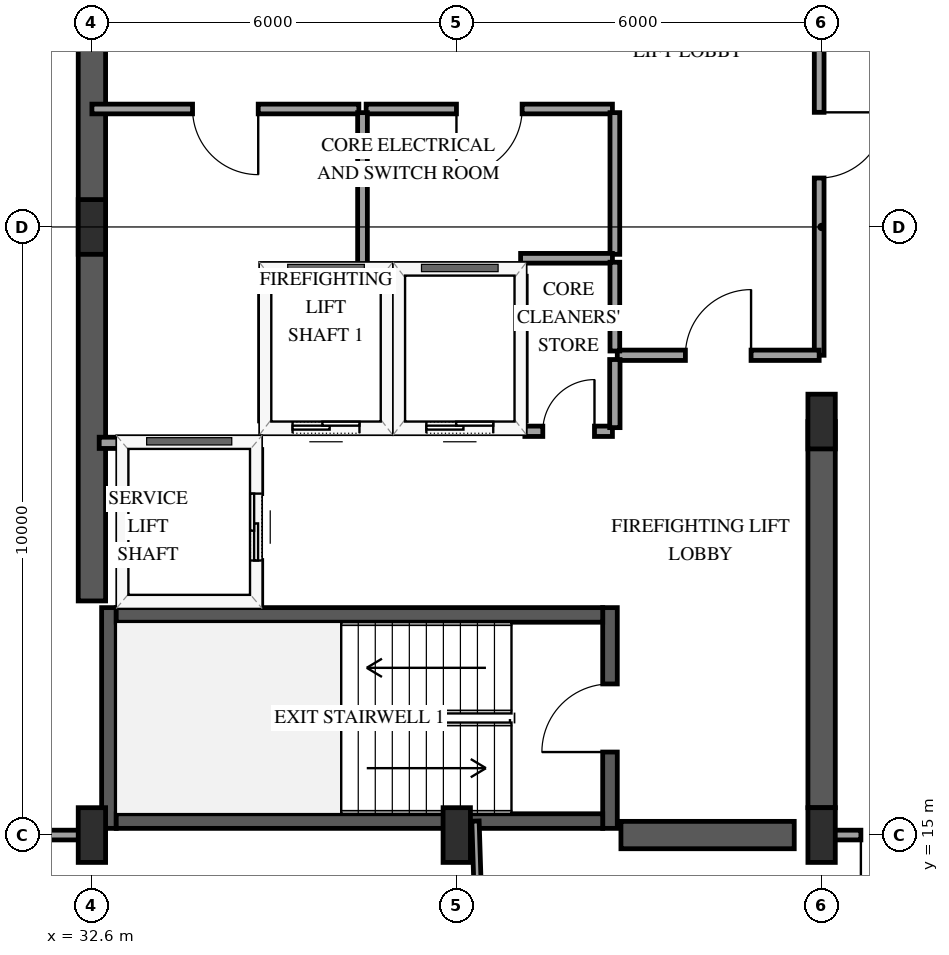
"""IFC4 building model, lengths in metres.
Left out: names, types, materials, properties, quantities, classifications, styles, units other than length and angle.
Written with IfcOpenShell. Run it as: python <this file> out.ifc"""

import sys

from ifc_helpers import new_model, si_unit, direction, frame, frame_2d, origin, origin_2d, place, context, subcontext, project, spatial, rectangle, extrude, element, fill, save


model = new_model("IFC4")
c1 = context("Model", 3, precision=1e-05, world=origin(), true_north=direction((0.0, 1.0)))
c2 = subcontext(c1, "Body", "Model", "MODEL_VIEW")
j1 = project(units=[si_unit("LENGTHUNIT", "METRE"), si_unit("PLANEANGLEUNIT", "RADIAN")], contexts=[c1])
p1 = place(None, origin())
s1 = spatial("IfcSite", under=j1, at=p1, CompositionType="ELEMENT")
p2 = place(p1, origin())
s2 = spatial("IfcBuilding", under=s1, at=p2, CompositionType="ELEMENT")
p3 = place(p2, frame((0.0, 0.0, 261.25)))
s3 = spatial("IfcBuildingStorey", under=s2, at=p3, CompositionType="ELEMENT", Elevation=261.25)
p4 = place(p3, frame((32.88, 15.11, 0.0), z_axis=(0.0, 0.0, 1.0), x_axis=(0.0, 1.0, 0.0)))
e1 = element("IfcWall", 1, at=p4, inside=s3, PredefinedType="SHEAR", context=c2, shape_type="SweptSolid", body=[
    extrude(rectangle(XDim=3.63, YDim=0.24, at=frame_2d((1.815, 0.0))), origin(), (0.0, 0.0, 1.0), 3.75),
])
p5 = place(p3, frame((41.12, 15.11, 0.0), z_axis=(0.0, 0.0, 1.0), x_axis=(0.0, 1.0, 0.0)))
e2 = element("IfcWall", 2, at=p5, inside=s3, PredefinedType="SHEAR", context=c2, shape_type="SweptSolid", body=[
    extrude(rectangle(XDim=3.63, YDim=0.24, at=frame_2d((1.815, 0.0))), origin(), (0.0, 0.0, 1.0), 3.75),
])
p6 = place(p5, frame((1.255, 0.0, 0.0)))
e3 = element("IfcOpeningElement", 3, at=p6, cuts=e2, PredefinedType="OPENING", context=c2, shape_type="SweptSolid", body=[
    extrude(rectangle(XDim=1.12, YDim=2.15, at=frame_2d((0.56, 1.075))), frame((0.0, 0.13, 0.0), z_axis=(0.0, -1.0, 0.0), x_axis=(1.0, 0.0, 0.0)), (0.0, 0.0, 1.0), 0.26),
])
for number, where, z_axis, x_axis in (
    (4, (33.0, 15.23, 0.0), (0.0, 0.0, 1.0), (1.0, 0.0, 0.0)),
    (5, (33.0, 18.62, 0.0), (0.0, 0.0, 1.0), (1.0, 0.0, 0.0)),
):
    element("IfcWall", number, at=place(p3, frame(where, z_axis=z_axis, x_axis=x_axis)), inside=s3, PredefinedType="SHEAR", context=c2, shape_type="SweptSolid", body=[
        extrude(rectangle(XDim=8.0, YDim=0.24, at=frame_2d((4.0, 0.0))), origin(), (0.0, 0.0, 1.0), 3.75),
    ])
p7 = place(p3, frame((32.6, 18.85, 0.0), z_axis=(0.0, 0.0, 1.0), x_axis=(0.0, 1.0, 0.0)))
e6 = element("IfcWall", 6, at=p7, inside=s3, PredefinedType="SHEAR", context=c2, shape_type="SweptSolid", body=[
    extrude(rectangle(XDim=12.3, YDim=0.45, at=frame_2d((6.15, 0.0))), origin(), (0.0, 0.0, 1.0), 3.75),
])
p8 = place(p3, frame((41.3, 15.0, 0.0), z_axis=(0.0, 0.0, 1.0), x_axis=(1.0, 0.0, 0.0)))
e7 = element("IfcWall", 7, at=p8, inside=s3, PredefinedType="SHEAR", context=c2, shape_type="SweptSolid", body=[
    extrude(rectangle(XDim=2.85, YDim=0.45, at=frame_2d((1.425, 0.0))), origin(), (0.0, 0.0, 1.0), 3.75),
])
p9 = place(p3, frame((44.6, 15.45, 0.0), z_axis=(0.0, 0.0, 1.0), x_axis=(0.0, 1.0, 0.0)))
e8 = element("IfcWall", 8, at=p9, inside=s3, PredefinedType="SHEAR", context=c2, shape_type="SweptSolid", body=[
    extrude(rectangle(XDim=6.35, YDim=0.45, at=frame_2d((3.175, 0.0))), origin(), (0.0, 0.0, 1.0), 3.75),
])
for number, where, z_axis, x_axis in (
    (9, (32.6, 15.0, 0.0), (0.0, 0.0, 1.0), (1.0, 0.0, 0.0)),
    (10, (32.6, 25.0, 0.0), (0.0, 0.0, 1.0), (1.0, 0.0, 0.0)),
    (11, (38.6, 15.0, 0.0), (0.0, 0.0, 1.0), (1.0, 0.0, 0.0)),
    (12, (44.6, 15.0, 0.0), (0.0, 0.0, 1.0), (1.0, 0.0, 0.0)),
    (13, (44.6, 21.8, 0.0), (0.0, 0.0, 1.0), (1.0, 0.0, 0.0)),
):
    element("IfcColumn", number, at=place(p3, frame(where, z_axis=z_axis, x_axis=x_axis)), inside=s3, PredefinedType="PILASTER", context=c2, shape_type="SweptSolid", body=[
        extrude(rectangle(XDim=0.45, YDim=0.9, at=origin_2d()), origin(), (0.0, 0.0, 1.0), 3.75),
    ])
p10 = place(p3, frame((35.45, 21.7, 0.0), z_axis=(0.0, 0.0, 1.0), x_axis=(1.0, 0.0, 0.0)))
e14 = element("IfcWall", 14, at=p10, inside=s3, PredefinedType="SOLIDWALL", context=c2, shape_type="SweptSolid", body=[
    extrude(rectangle(XDim=2.0, YDim=0.185, at=frame_2d((1.0, 0.0))), origin(), (0.0, 0.0, 1.0), 3.45),
])
p11 = place(p10, frame((0.45, 0.0, 0.0)))
e15 = element("IfcOpeningElement", 15, at=p11, cuts=e14, PredefinedType="OPENING", context=c2, shape_type="SweptSolid", body=[
    extrude(rectangle(XDim=1.1, YDim=2.15, at=frame_2d((0.55, 1.075))), frame((0.0, 0.103, 0.0), z_axis=(0.0, -1.0, 0.0), x_axis=(1.0, 0.0, 0.0)), (0.0, 0.0, 1.0), 0.205),
])
p12 = place(p3, frame((35.45, 24.3, 0.0), z_axis=(0.0, 0.0, 1.0), x_axis=(1.0, 0.0, 0.0)))
e16 = element("IfcWall", 16, at=p12, inside=s3, PredefinedType="SOLIDWALL", context=c2, shape_type="SweptSolid", body=[
    extrude(rectangle(XDim=2.0, YDim=0.185, at=frame_2d((1.0, 0.0))), origin(), (0.0, 0.0, 1.0), 3.45),
])
for number, where, z_axis, x_axis in (
    (17, (35.45, 21.81, 0.0), (0.0, 0.0, 1.0), (0.0, 1.0, 0.0)),
    (18, (37.45, 21.81, 0.0), (0.0, 0.0, 1.0), (0.0, 1.0, 0.0)),
):
    element("IfcWall", number, at=place(p3, frame(where, z_axis=z_axis, x_axis=x_axis)), inside=s3, PredefinedType="SOLIDWALL", context=c2, shape_type="SweptSolid", body=[
        extrude(rectangle(XDim=2.38, YDim=0.185, at=frame_2d((1.19, 0.0))), origin(), (0.0, 0.0, 1.0), 3.45),
    ])
p13 = place(p3, frame((37.65, 21.7, 0.0), z_axis=(0.0, 0.0, 1.0), x_axis=(1.0, 0.0, 0.0)))
e19 = element("IfcWall", 19, at=p13, inside=s3, PredefinedType="SOLIDWALL", context=c2, shape_type="SweptSolid", body=[
    extrude(rectangle(XDim=2.0, YDim=0.185, at=frame_2d((1.0, 0.0))), origin(), (0.0, 0.0, 1.0), 3.45),
])
p14 = place(p13, frame((0.45, 0.0, 0.0)))
e20 = element("IfcOpeningElement", 20, at=p14, cuts=e19, PredefinedType="OPENING", context=c2, shape_type="SweptSolid", body=[
    extrude(rectangle(XDim=1.1, YDim=2.15, at=frame_2d((0.55, 1.075))), frame((0.0, 0.103, 0.0), z_axis=(0.0, -1.0, 0.0), x_axis=(1.0, 0.0, 0.0)), (0.0, 0.0, 1.0), 0.205),
])
p15 = place(p3, frame((37.65, 24.3, 0.0), z_axis=(0.0, 0.0, 1.0), x_axis=(1.0, 0.0, 0.0)))
e21 = element("IfcWall", 21, at=p15, inside=s3, PredefinedType="SOLIDWALL", context=c2, shape_type="SweptSolid", body=[
    extrude(rectangle(XDim=2.0, YDim=0.185, at=frame_2d((1.0, 0.0))), origin(), (0.0, 0.0, 1.0), 3.45),
])
p16 = place(p3, frame((39.65, 21.81, 0.0), z_axis=(0.0, 0.0, 1.0), x_axis=(0.0, 1.0, 0.0)))
e22 = element("IfcWall", 22, at=p16, inside=s3, PredefinedType="SOLIDWALL", context=c2, shape_type="SweptSolid", body=[
    extrude(rectangle(XDim=2.38, YDim=0.185, at=frame_2d((1.19, 0.0))), origin(), (0.0, 0.0, 1.0), 3.45),
])
p17 = place(p3, frame((32.72, 21.45, 0.0), z_axis=(0.0, 0.0, 1.0), x_axis=(1.0, 0.0, 0.0)))
e23 = element("IfcWall", 23, at=p17, inside=s3, PredefinedType="SOLIDWALL", context=c2, shape_type="SweptSolid", body=[
    extrude(rectangle(XDim=2.58, YDim=0.185, at=frame_2d((1.29, 0.0))), origin(), (0.0, 0.0, 1.0), 3.45),
])
p18 = place(p3, frame((35.3, 18.79, 0.0), z_axis=(0.0, 0.0, 1.0), x_axis=(0.0, 1.0, 0.0)))
e24 = element("IfcWall", 24, at=p18, inside=s3, PredefinedType="SOLIDWALL", context=c2, shape_type="SweptSolid", body=[
    extrude(rectangle(XDim=2.55, YDim=0.185, at=frame_2d((1.275, 0.0))), origin(), (0.0, 0.0, 1.0), 3.45),
])
p19 = place(p18, frame((0.725, 0.0, 0.0)))
e25 = element("IfcOpeningElement", 25, at=p19, cuts=e24, PredefinedType="OPENING", context=c2, shape_type="SweptSolid", body=[
    extrude(rectangle(XDim=1.1, YDim=2.15, at=frame_2d((0.55, 1.075))), frame((0.0, 0.103, 0.0), z_axis=(0.0, -1.0, 0.0), x_axis=(1.0, 0.0, 0.0)), (0.0, 0.0, 1.0), 0.205),
])
p20 = place(p3, frame((38.908, 15.23, 0.0), z_axis=(0.0, 0.0, 1.0), x_axis=(0.031687554573, -0.999497823352, 0.0)))
e26 = element("IfcWall", 26, at=p20, inside=s3, PredefinedType="PARTITIONING", context=c2, shape_type="SweptSolid", body=[
    extrude(rectangle(XDim=7.289, YDim=0.12, at=frame_2d((3.644, 0.0))), origin(), (0.0, 0.0, 1.0), 2.828),
])
p21 = place(p3, frame((44.56, 29.8, 0.0), z_axis=(0.0, 0.0, 1.0), x_axis=(0.0, -1.0, 0.0)))
e27 = element("IfcWall", 27, at=p21, inside=s3, PredefinedType="PARTITIONING", context=c2, shape_type="SweptSolid", body=[
    extrude(rectangle(XDim=6.91, YDim=0.16, at=frame_2d((3.455, 0.0))), origin(), (0.0, 0.0, 1.0), 2.49),
])
p22 = place(p21, frame((2.915, 0.0, 0.0)))
e28 = element("IfcOpeningElement", 28, at=p22, cuts=e27, PredefinedType="OPENING", context=c2, shape_type="SweptSolid", body=[
    extrude(rectangle(XDim=1.08, YDim=2.15, at=frame_2d((0.54, 1.075))), frame((0.0, 0.09, 0.0), z_axis=(0.0, -1.0, 0.0), x_axis=(1.0, 0.0, 0.0)), (0.0, 0.0, 1.0), 0.18),
])
p23 = place(p3, frame((36.99, 26.94, 0.0), z_axis=(0.0, 0.0, 1.0), x_axis=(-1.0, 0.0, 0.0)))
e29 = element("IfcWall", 29, at=p23, inside=s3, PredefinedType="PARTITIONING", context=c2, shape_type="SweptSolid", body=[
    extrude(rectangle(XDim=4.39, YDim=0.16, at=frame_2d((2.195, 0.0))), origin(), (0.0, 0.0, 1.0), 3.45),
])
p24 = place(p23, frame((1.655, 0.0, 0.0)))
e30 = element("IfcOpeningElement", 30, at=p24, cuts=e29, PredefinedType="OPENING", context=c2, shape_type="SweptSolid", body=[
    extrude(rectangle(XDim=1.08, YDim=2.15, at=frame_2d((0.54, 1.075))), frame((0.0, 0.09, 0.0), z_axis=(0.0, -1.0, 0.0), x_axis=(1.0, 0.0, 0.0)), (0.0, 0.0, 1.0), 0.18),
])
p25 = place(p3, frame((41.16, 26.94, 0.0), z_axis=(0.0, 0.0, 1.0), x_axis=(-1.0, 0.0, 0.0)))
e31 = element("IfcWall", 31, at=p25, inside=s3, PredefinedType="PARTITIONING", context=c2, shape_type="SweptSolid", body=[
    extrude(rectangle(XDim=4.05, YDim=0.16, at=frame_2d((2.025, 0.0))), origin(), (0.0, 0.0, 1.0), 3.45),
])
p26 = place(p25, frame((1.485, 0.0, 0.0)))
e32 = element("IfcOpeningElement", 32, at=p26, cuts=e31, PredefinedType="OPENING", context=c2, shape_type="SweptSolid", body=[
    extrude(rectangle(XDim=1.08, YDim=2.15, at=frame_2d((0.54, 1.075))), frame((0.0, 0.09, 0.0), z_axis=(0.0, -1.0, 0.0), x_axis=(1.0, 0.0, 0.0)), (0.0, 0.0, 1.0), 0.18),
])
p27 = place(p3, frame((41.24, 22.89, 0.0), z_axis=(0.0, 0.0, 1.0), x_axis=(1.0, 0.0, 0.0)))
e33 = element("IfcWall", 33, at=p27, inside=s3, PredefinedType="PARTITIONING", context=c2, shape_type="SweptSolid", body=[
    extrude(rectangle(XDim=3.32, YDim=0.17, at=frame_2d((1.66, 0.0))), origin(), (0.0, 0.0, 1.0), 3.45),
])
p28 = place(p27, frame((1.12, 0.0, 0.0)))
e34 = element("IfcOpeningElement", 34, at=p28, cuts=e33, PredefinedType="OPENING", context=c2, shape_type="SweptSolid", body=[
    extrude(rectangle(XDim=1.08, YDim=2.15, at=frame_2d((0.54, 1.075))), frame((0.0, 0.095, 0.0), z_axis=(0.0, -1.0, 0.0), x_axis=(1.0, 0.0, 0.0)), (0.0, 0.0, 1.0), 0.19),
])
p29 = place(p3, frame((32.53, 15.0, 0.0), z_axis=(0.0, 0.0, 1.0), x_axis=(-1.0, 0.0, 0.0)))
e35 = element("IfcWall", 35, at=p29, inside=s3, PredefinedType="PARTITIONING", context=c2, shape_type="SweptSolid", body=[
    extrude(rectangle(XDim=2.621, YDim=0.16, at=frame_2d((1.311, 0.0))), origin(), (0.0, 0.0, 1.0), 3.45),
])
p30 = place(p29, frame((0.836, 0.0, 0.0)))
e36 = element("IfcOpeningElement", 36, at=p30, cuts=e35, PredefinedType="OPENING", context=c2, shape_type="SweptSolid", body=[
    extrude(rectangle(XDim=0.95, YDim=2.15, at=frame_2d((0.475, 1.075))), frame((0.0, 0.09, 0.0), z_axis=(0.0, -1.0, 0.0), x_axis=(1.0, 0.0, 0.0)), (0.0, 0.0, 1.0), 0.18),
])
p31 = place(p3, frame((37.05, 26.88, 0.0), z_axis=(0.0, 0.0, 1.0), x_axis=(0.0, -1.0, 0.0)))
e37 = element("IfcWall", 37, at=p31, inside=s3, PredefinedType="PARTITIONING", context=c2, shape_type="SweptSolid", body=[
    extrude(rectangle(XDim=2.58, YDim=0.16, at=frame_2d((1.29, 0.0))), origin(), (0.0, 0.0, 1.0), 3.45),
])
p32 = place(p3, frame((41.2, 24.55, 0.0), z_axis=(0.0, 0.0, 1.0), x_axis=(0.0, 1.0, 0.0)))
e38 = element("IfcWall", 38, at=p32, inside=s3, PredefinedType="PARTITIONING", context=c2, shape_type="SweptSolid", body=[
    extrude(rectangle(XDim=2.33, YDim=0.16, at=frame_2d((1.165, 0.0))), origin(), (0.0, 0.0, 1.0), 3.45),
])
p33 = place(p3, frame((46.58, 15.0, 0.0), z_axis=(0.0, 0.0, 1.0), x_axis=(-1.0, 0.0, 0.0)))
e39 = element("IfcWall", 39, at=p33, inside=s3, PredefinedType="PARTITIONING", context=c2, shape_type="SweptSolid", body=[
    extrude(rectangle(XDim=1.91, YDim=0.16, at=frame_2d((0.955, 0.0))), origin(), (0.0, 0.0, 1.0), 3.45),
])
p34 = place(p33, frame((0.384, 0.0, 0.0)))
e40 = element("IfcOpeningElement", 40, at=p34, cuts=e39, PredefinedType="OPENING", context=c2, shape_type="SweptSolid", body=[
    extrude(rectangle(XDim=0.95, YDim=2.15, at=frame_2d((0.475, 1.075))), frame((0.0, 0.09, 0.0), z_axis=(0.0, -1.0, 0.0), x_axis=(1.0, 0.0, 0.0)), (0.0, 0.0, 1.0), 0.18),
])
p35 = place(p3, frame((39.65, 24.485, 0.0), z_axis=(0.0, 0.0, 1.0), x_axis=(1.0, 0.0, 0.0)))
e41 = element("IfcWall", 41, at=p35, inside=s3, PredefinedType="PARTITIONING", context=c2, shape_type="SweptSolid", body=[
    extrude(rectangle(XDim=1.51, YDim=0.16, at=frame_2d((0.755, 0.0))), origin(), (0.0, 0.0, 1.0), 3.45),
])
p36 = place(p3, frame((41.2, 22.96, 0.0), z_axis=(0.0, 0.0, 1.0), x_axis=(0.0, 1.0, 0.0)))
e42 = element("IfcWall", 42, at=p36, inside=s3, PredefinedType="PARTITIONING", context=c2, shape_type="SweptSolid", body=[
    extrude(rectangle(XDim=1.46, YDim=0.16, at=frame_2d((0.73, 0.0))), origin(), (0.0, 0.0, 1.0), 3.45),
])
p37 = place(p3, frame((39.72, 21.64, 0.0), z_axis=(0.0, 0.0, 1.0), x_axis=(1.0, 0.0, 0.0)))
e43 = element("IfcWall", 43, at=p37, inside=s3, PredefinedType="PARTITIONING", context=c2, shape_type="SweptSolid", body=[
    extrude(rectangle(XDim=1.44, YDim=0.17, at=frame_2d((0.72, 0.0))), origin(), (0.0, 0.0, 1.0), 3.45),
])
p38 = place(p37, frame((0.295, 0.0, 0.0)))
e44 = element("IfcOpeningElement", 44, at=p38, cuts=e43, PredefinedType="OPENING", context=c2, shape_type="SweptSolid", body=[
    extrude(rectangle(XDim=0.85, YDim=2.1, at=frame_2d((0.425, 1.05))), frame((0.0, 0.095, 0.0), z_axis=(0.0, -1.0, 0.0), x_axis=(1.0, 0.0, 0.0)), (0.0, 0.0, 1.0), 0.19),
])
p39 = place(p3, frame((41.2, 21.7, 0.0), z_axis=(0.0, 0.0, 1.0), x_axis=(0.0, 1.0, 0.0)))
e45 = element("IfcWall", 45, at=p39, inside=s3, PredefinedType="PARTITIONING", context=c2, shape_type="SweptSolid", body=[
    extrude(rectangle(XDim=1.12, YDim=0.17, at=frame_2d((0.56, 0.0))), origin(), (0.0, 0.0, 1.0), 3.45),
])
p40 = place(p11, origin())
e46 = element("IfcDoor", 46, at=p40, inside=s3, OperationType="SLIDING_TO_LEFT", PredefinedType="DOOR", context=c2, shape_type="SweptSolid", body=[
    extrude(rectangle(XDim=1.1, YDim=2.15, at=frame_2d((0.55, 1.075))), frame((0.0, 0.025, 0.0), z_axis=(0.0, -1.0, 0.0), x_axis=(1.0, 0.0, 0.0)), (0.0, 0.0, 1.0), 0.05),
])
fill(e15, e46)
p41 = place(p14, origin())
e47 = element("IfcDoor", 47, at=p41, inside=s3, OperationType="SLIDING_TO_LEFT", PredefinedType="DOOR", context=c2, shape_type="SweptSolid", body=[
    extrude(rectangle(XDim=1.1, YDim=2.15, at=frame_2d((0.55, 1.075))), frame((0.0, 0.025, 0.0), z_axis=(0.0, -1.0, 0.0), x_axis=(1.0, 0.0, 0.0)), (0.0, 0.0, 1.0), 0.05),
])
fill(e20, e47)
p42 = place(p19, origin())
e48 = element("IfcDoor", 48, at=p42, inside=s3, OperationType="SLIDING_TO_LEFT", PredefinedType="DOOR", context=c2, shape_type="SweptSolid", body=[
    extrude(rectangle(XDim=1.1, YDim=2.15, at=frame_2d((0.55, 1.075))), frame((0.0, 0.025, 0.0), z_axis=(0.0, -1.0, 0.0), x_axis=(1.0, 0.0, 0.0)), (0.0, 0.0, 1.0), 0.05),
])
fill(e25, e48)
p43 = place(p6, origin())
e49 = element("IfcDoor", 49, at=p43, inside=s3, OperationType="SINGLE_SWING_LEFT", PredefinedType="DOOR", context=c2, shape_type="SweptSolid", body=[
    extrude(rectangle(XDim=1.12, YDim=2.15, at=frame_2d((0.56, 1.075))), frame((0.0, 0.025, 0.0), z_axis=(0.0, -1.0, 0.0), x_axis=(1.0, 0.0, 0.0)), (0.0, 0.0, 1.0), 0.05),
])
fill(e3, e49)
p44 = place(p22, origin())
e50 = element("IfcDoor", 50, at=p44, inside=s3, OperationType="SINGLE_SWING_LEFT", PredefinedType="DOOR", context=c2, shape_type="SweptSolid", body=[
    extrude(rectangle(XDim=1.08, YDim=2.15, at=frame_2d((0.54, 1.075))), frame((0.0, 0.025, 0.0), z_axis=(0.0, -1.0, 0.0), x_axis=(1.0, 0.0, 0.0)), (0.0, 0.0, 1.0), 0.05),
])
fill(e28, e50)
p45 = place(p24, origin())
e51 = element("IfcDoor", 51, at=p45, inside=s3, OperationType="SINGLE_SWING_LEFT", PredefinedType="DOOR", context=c2, shape_type="SweptSolid", body=[
    extrude(rectangle(XDim=1.08, YDim=2.15, at=frame_2d((0.54, 1.075))), frame((0.0, 0.025, 0.0), z_axis=(0.0, -1.0, 0.0), x_axis=(1.0, 0.0, 0.0)), (0.0, 0.0, 1.0), 0.05),
])
fill(e30, e51)
p46 = place(p26, origin())
e52 = element("IfcDoor", 52, at=p46, inside=s3, OperationType="SINGLE_SWING_RIGHT", PredefinedType="DOOR", context=c2, shape_type="SweptSolid", body=[
    extrude(rectangle(XDim=1.08, YDim=2.15, at=frame_2d((0.54, 1.075))), frame((0.0, 0.025, 0.0), z_axis=(0.0, -1.0, 0.0), x_axis=(1.0, 0.0, 0.0)), (0.0, 0.0, 1.0), 0.05),
])
fill(e32, e52)
p47 = place(p28, origin())
e53 = element("IfcDoor", 53, at=p47, inside=s3, OperationType="SINGLE_SWING_RIGHT", PredefinedType="DOOR", context=c2, shape_type="SweptSolid", body=[
    extrude(rectangle(XDim=1.08, YDim=2.15, at=frame_2d((0.54, 1.075))), frame((0.0, 0.025, 0.0), z_axis=(0.0, -1.0, 0.0), x_axis=(1.0, 0.0, 0.0)), (0.0, 0.0, 1.0), 0.05),
])
fill(e34, e53)
p48 = place(p34, origin())
e54 = element("IfcDoor", 54, at=p48, inside=s3, OperationType="SINGLE_SWING_RIGHT", PredefinedType="DOOR", context=c2, shape_type="SweptSolid", body=[
    extrude(rectangle(XDim=0.95, YDim=2.15, at=frame_2d((0.475, 1.075))), frame((0.0, 0.025, 0.0), z_axis=(0.0, -1.0, 0.0), x_axis=(1.0, 0.0, 0.0)), (0.0, 0.0, 1.0), 0.05),
])
fill(e40, e54)
p49 = place(p38, origin())
e55 = element("IfcDoor", 55, at=p49, inside=s3, OperationType="SINGLE_SWING_RIGHT", PredefinedType="DOOR", context=c2, shape_type="SweptSolid", body=[
    extrude(rectangle(XDim=0.85, YDim=2.1, at=frame_2d((0.425, 1.05))), frame((0.0, 0.025, 0.0), z_axis=(0.0, -1.0, 0.0), x_axis=(1.0, 0.0, 0.0)), (0.0, 0.0, 1.0), 0.05),
])
fill(e44, e55)
save(model, sys.argv[1])
